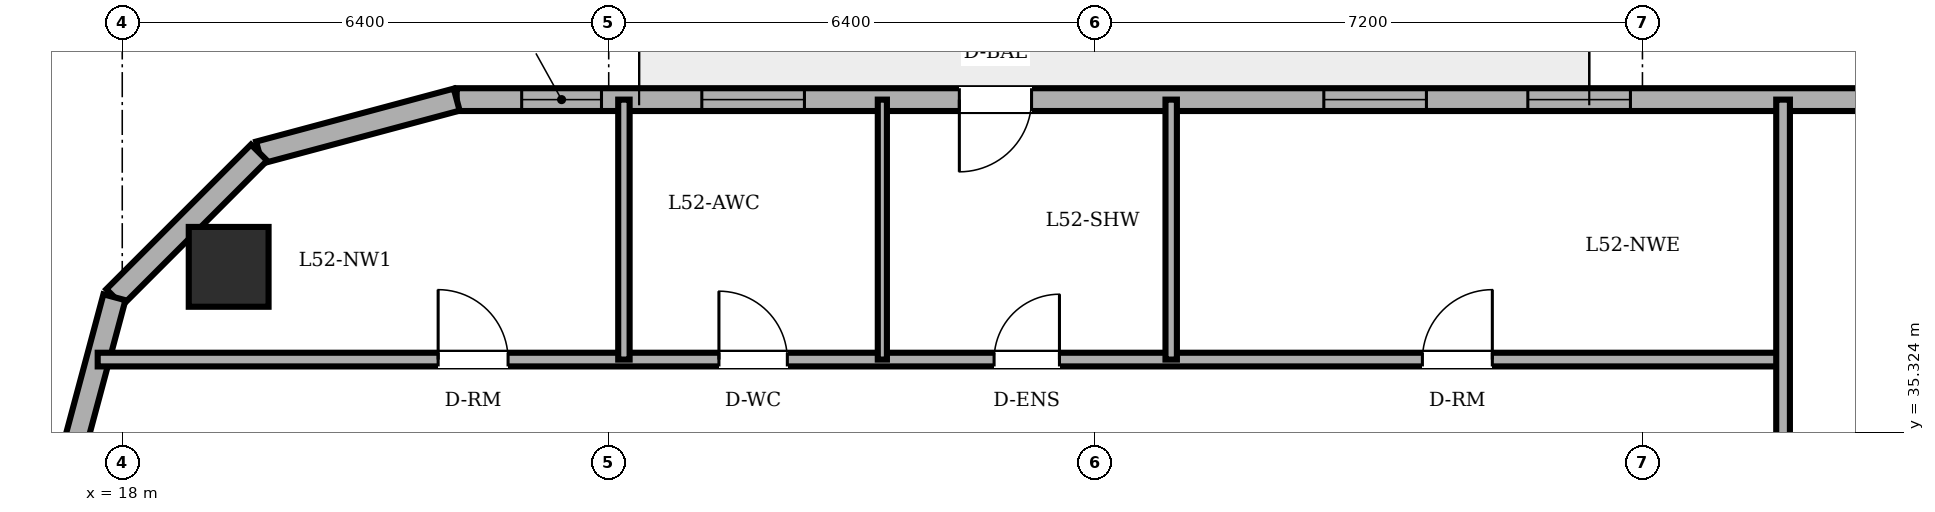
"""IFC4 building model, lengths in metres.
Left out: names, types, materials, properties, quantities, classifications, styles, units other than length and angle.
Written with IfcOpenShell. Run it as: python <this file> out.ifc"""

import sys

from ifc_helpers import new_model, si_unit, direction, frame, frame_2d, origin, origin_2d, place, context, subcontext, project, spatial, rectangle, circle, extrude, element, fill, save


model = new_model("IFC4")
c1 = context("Model", 3, precision=1e-05, world=origin(), true_north=direction((0.0, 1.0)))
c2 = subcontext(c1, "Body", "Model", "MODEL_VIEW")
j1 = project(units=[si_unit("LENGTHUNIT", "METRE"), si_unit("PLANEANGLEUNIT", "RADIAN")], contexts=[c1])
p1 = place(None, origin())
s1 = spatial("IfcSite", under=j1, at=p1, CompositionType="ELEMENT")
p2 = place(p1, origin())
s2 = spatial("IfcBuilding", under=s1, at=p2, CompositionType="ELEMENT")
p3 = place(p2, frame((0.0, 0.0, 201.3)))
s3 = spatial("IfcBuildingStorey", under=s2, at=p3, CompositionType="ELEMENT", Elevation=201.3)
p4 = place(p3, frame((19.4, 37.5, 0.0), z_axis=(0.0, 0.0, 1.0), x_axis=(1.0, 0.0, 0.0)))
e1 = element("IfcColumn", 1, at=p4, inside=s3, PredefinedType="COLUMN", context=c2, shape_type="SweptSolid", body=[
    extrude(circle(Radius=0.525, at=origin_2d()), origin(), (0.0, 0.0, 1.0), 3.6),
])
p5 = place(p3, frame((54.885, 39.7, 0.0), z_axis=(0.0, 0.0, 1.0), x_axis=(-1.0, 0.0, 0.0)))
e2 = element("IfcWall", 2, at=p5, inside=s3, PredefinedType="SOLIDWALL", context=c2, shape_type="SweptSolid", body=[
    extrude(rectangle(XDim=32.485, YDim=0.3, at=frame_2d((16.243, 0.0))), origin(), (0.0, 0.0, 1.0), 3.4),
])
p6 = place(p5, frame((24.922, 0.0, 0.0)))
e3 = element("IfcOpeningElement", 3, at=p6, cuts=e2, PredefinedType="OPENING", context=c2, shape_type="SweptSolid", body=[
    extrude(rectangle(XDim=0.95, YDim=2.2, at=frame_2d((0.475, 1.1))), frame((0.0, 0.16, 0.0), z_axis=(0.0, -1.0, 0.0), x_axis=(1.0, 0.0, 0.0)), (0.0, 0.0, 1.0), 0.32),
])
p7 = place(p5, frame((4.57, 0.0, 0.85)))
e4 = element("IfcOpeningElement", 4, at=p7, cuts=e2, PredefinedType="OPENING", context=c2, shape_type="SweptSolid", body=[
    extrude(rectangle(XDim=1.35, YDim=1.55, at=frame_2d((0.675, 0.775))), frame((0.0, 0.16, 0.0), z_axis=(0.0, -1.0, 0.0), x_axis=(1.0, 0.0, 0.0)), (0.0, 0.0, 1.0), 0.32),
])
p8 = place(p5, frame((9.465, 0.0, 0.85)))
e5 = element("IfcOpeningElement", 5, at=p8, cuts=e2, PredefinedType="OPENING", context=c2, shape_type="SweptSolid", body=[
    extrude(rectangle(XDim=1.35, YDim=1.55, at=frame_2d((0.675, 0.775))), frame((0.0, 0.16, 0.0), z_axis=(0.0, -1.0, 0.0), x_axis=(1.0, 0.0, 0.0)), (0.0, 0.0, 1.0), 0.32),
])
p9 = place(p5, frame((17.043, 0.0, 0.85)))
e6 = element("IfcOpeningElement", 6, at=p9, cuts=e2, PredefinedType="OPENING", context=c2, shape_type="SweptSolid", body=[
    extrude(rectangle(XDim=1.35, YDim=1.55, at=frame_2d((0.675, 0.775))), frame((0.0, 0.16, 0.0), z_axis=(0.0, -1.0, 0.0), x_axis=(1.0, 0.0, 0.0)), (0.0, 0.0, 1.0), 0.32),
])
p10 = place(p5, frame((19.727, 0.0, 0.85)))
e7 = element("IfcOpeningElement", 7, at=p10, cuts=e2, PredefinedType="OPENING", context=c2, shape_type="SweptSolid", body=[
    extrude(rectangle(XDim=1.35, YDim=1.55, at=frame_2d((0.675, 0.775))), frame((0.0, 0.16, 0.0), z_axis=(0.0, -1.0, 0.0), x_axis=(1.0, 0.0, 0.0)), (0.0, 0.0, 1.0), 0.32),
])
p11 = place(p5, frame((27.91, 0.0, 0.85)))
e8 = element("IfcOpeningElement", 8, at=p11, cuts=e2, PredefinedType="OPENING", context=c2, shape_type="SweptSolid", body=[
    extrude(rectangle(XDim=1.35, YDim=1.55, at=frame_2d((0.675, 0.775))), frame((0.0, 0.16, 0.0), z_axis=(0.0, -1.0, 0.0), x_axis=(1.0, 0.0, 0.0)), (0.0, 0.0, 1.0), 0.32),
])
p12 = place(p5, frame((30.58, 0.0, 0.85)))
e9 = element("IfcOpeningElement", 9, at=p12, cuts=e2, PredefinedType="OPENING", context=c2, shape_type="SweptSolid", body=[
    extrude(rectangle(XDim=1.05, YDim=1.55, at=frame_2d((0.525, 0.775))), frame((0.0, 0.16, 0.0), z_axis=(0.0, -1.0, 0.0), x_axis=(1.0, 0.0, 0.0)), (0.0, 0.0, 1.0), 0.32),
])
p13 = place(p3, frame((22.4, 39.7, 0.0), z_axis=(0.0, 0.0, 1.0), x_axis=(-0.965889330541, -0.258955210695, 0.0)))
e10 = element("IfcWall", 10, at=p13, inside=s3, PredefinedType="SOLIDWALL", context=c2, shape_type="SweptSolid", body=[
    extrude(rectangle(XDim=2.692, YDim=0.3, at=frame_2d((1.346, 0.0))), origin(), (0.0, 0.0, 1.0), 3.4),
])
p14 = place(p3, frame((19.8, 39.003, 0.0), z_axis=(0.0, 0.0, 1.0), x_axis=(-0.707152139074, -0.70706142039, 0.0)))
e11 = element("IfcWall", 11, at=p14, inside=s3, PredefinedType="SOLIDWALL", context=c2, shape_type="SweptSolid", body=[
    extrude(rectangle(XDim=2.691, YDim=0.3, at=frame_2d((1.346, 0.0))), origin(), (0.0, 0.0, 1.0), 3.4),
])
p15 = place(p3, frame((17.897, 37.1, 0.0), z_axis=(0.0, 0.0, 1.0), x_axis=(-0.258932525951, -0.965895412042, 0.0)))
e12 = element("IfcWall", 12, at=p15, inside=s3, PredefinedType="SOLIDWALL", context=c2, shape_type="SweptSolid", body=[
    extrude(rectangle(XDim=2.692, YDim=0.3, at=frame_2d((1.346, 0.0))), origin(), (0.0, 0.0, 1.0), 3.4),
])
p16 = place(p3, frame((17.677, 36.28, 0.0), z_axis=(0.0, 0.0, 1.0), x_axis=(1.0, 0.0, 0.0)))
e13 = element("IfcWall", 13, at=p16, inside=s3, PredefinedType="PARTITIONING", context=c2, shape_type="SweptSolid", body=[
    extrude(rectangle(XDim=22.173, YDim=0.18, at=frame_2d((11.086, 0.0))), origin(), (0.0, 0.0, 1.0), 3.4),
])
p17 = place(p16, frame((8.173, 0.0, 0.0)))
e14 = element("IfcOpeningElement", 14, at=p17, cuts=e13, PredefinedType="OPENING", context=c2, shape_type="SweptSolid", body=[
    extrude(rectangle(XDim=0.9, YDim=2.1, at=frame_2d((0.45, 1.05))), frame((0.0, 0.1, 0.0), z_axis=(0.0, -1.0, 0.0), x_axis=(1.0, 0.0, 0.0)), (0.0, 0.0, 1.0), 0.2),
])
p18 = place(p16, frame((11.793, 0.0, 0.0)))
e15 = element("IfcOpeningElement", 15, at=p18, cuts=e13, PredefinedType="OPENING", context=c2, shape_type="SweptSolid", body=[
    extrude(rectangle(XDim=0.86, YDim=2.1, at=frame_2d((0.43, 1.05))), frame((0.0, 0.1, 0.0), z_axis=(0.0, -1.0, 0.0), x_axis=(1.0, 0.0, 0.0)), (0.0, 0.0, 1.0), 0.2),
])
p19 = place(p16, frame((4.479, 0.0, 0.0)))
e16 = element("IfcOpeningElement", 16, at=p19, cuts=e13, PredefinedType="OPENING", context=c2, shape_type="SweptSolid", body=[
    extrude(rectangle(XDim=0.92, YDim=2.1, at=frame_2d((0.46, 1.05))), frame((0.0, 0.1, 0.0), z_axis=(0.0, -1.0, 0.0), x_axis=(1.0, 0.0, 0.0)), (0.0, 0.0, 1.0), 0.2),
])
p20 = place(p16, frame((17.428, 0.0, 0.0)))
e17 = element("IfcOpeningElement", 17, at=p20, cuts=e13, PredefinedType="OPENING", context=c2, shape_type="SweptSolid", body=[
    extrude(rectangle(XDim=0.92, YDim=2.1, at=frame_2d((0.46, 1.05))), frame((0.0, 0.1, 0.0), z_axis=(0.0, -1.0, 0.0), x_axis=(1.0, 0.0, 0.0)), (0.0, 0.0, 1.0), 0.2),
])
p21 = place(p3, frame((24.6, 36.28, 0.0), z_axis=(0.0, 0.0, 1.0), x_axis=(0.0, 1.0, 0.0)))
e18 = element("IfcWall", 18, at=p21, inside=s3, PredefinedType="PARTITIONING", context=c2, shape_type="SweptSolid", body=[
    extrude(rectangle(XDim=3.42, YDim=0.15, at=frame_2d((1.71, 0.0))), origin(), (0.0, 0.0, 1.0), 3.4),
])
p22 = place(p3, frame((28.0, 36.28, 0.0), z_axis=(0.0, 0.0, 1.0), x_axis=(0.0, 1.0, 0.0)))
e19 = element("IfcWall", 19, at=p22, inside=s3, PredefinedType="PARTITIONING", context=c2, shape_type="SweptSolid", body=[
    extrude(rectangle(XDim=3.42, YDim=0.12, at=frame_2d((1.71, 0.0))), origin(), (0.0, 0.0, 1.0), 3.4),
])
p23 = place(p3, frame((31.8, 36.28, 0.0), z_axis=(0.0, 0.0, 1.0), x_axis=(0.0, 1.0, 0.0)))
e20 = element("IfcWall", 20, at=p23, inside=s3, PredefinedType="PARTITIONING", context=c2, shape_type="SweptSolid", body=[
    extrude(rectangle(XDim=3.42, YDim=0.15, at=frame_2d((1.71, 0.0))), origin(), (0.0, 0.0, 1.0), 3.4),
])
p24 = place(p3, frame((39.85, 25.18, 0.0), z_axis=(0.0, 0.0, 1.0), x_axis=(0.0, 1.0, 0.0)))
e21 = element("IfcWall", 21, at=p24, inside=s3, PredefinedType="PARTITIONING", context=c2, shape_type="SweptSolid", body=[
    extrude(rectangle(XDim=14.52, YDim=0.18, at=frame_2d((7.26, 0.0))), origin(), (0.0, 0.0, 1.0), 3.4),
])
p25 = place(p6, origin())
e22 = element("IfcDoor", 22, at=p25, inside=s3, OperationType="SINGLE_SWING_RIGHT", PredefinedType="DOOR", context=c2, shape_type="SweptSolid", body=[
    extrude(rectangle(XDim=0.95, YDim=2.2, at=frame_2d((0.475, 1.1))), frame((0.0, 0.025, 0.0), z_axis=(0.0, -1.0, 0.0), x_axis=(1.0, 0.0, 0.0)), (0.0, 0.0, 1.0), 0.05),
])
fill(e3, e22)
p26 = place(p9, origin())
e23 = element("IfcWindow", 23, at=p26, inside=s3, PartitioningType="SINGLE_PANEL", PredefinedType="WINDOW", context=c2, shape_type="SweptSolid", body=[
    extrude(rectangle(XDim=1.35, YDim=1.55, at=frame_2d((0.675, 0.775))), frame((0.0, 0.03, 0.0), z_axis=(0.0, -1.0, 0.0), x_axis=(1.0, 0.0, 0.0)), (0.0, 0.0, 1.0), 0.06),
])
fill(e6, e23)
p27 = place(p10, origin())
e24 = element("IfcWindow", 24, at=p27, inside=s3, PartitioningType="SINGLE_PANEL", PredefinedType="WINDOW", context=c2, shape_type="SweptSolid", body=[
    extrude(rectangle(XDim=1.35, YDim=1.55, at=frame_2d((0.675, 0.775))), frame((0.0, 0.03, 0.0), z_axis=(0.0, -1.0, 0.0), x_axis=(1.0, 0.0, 0.0)), (0.0, 0.0, 1.0), 0.06),
])
fill(e7, e24)
p28 = place(p11, origin())
e25 = element("IfcWindow", 25, at=p28, inside=s3, PartitioningType="SINGLE_PANEL", PredefinedType="WINDOW", context=c2, shape_type="SweptSolid", body=[
    extrude(rectangle(XDim=1.35, YDim=1.55, at=frame_2d((0.675, 0.775))), frame((0.0, 0.03, 0.0), z_axis=(0.0, -1.0, 0.0), x_axis=(1.0, 0.0, 0.0)), (0.0, 0.0, 1.0), 0.06),
])
fill(e8, e25)
p29 = place(p12, origin())
e26 = element("IfcWindow", 26, at=p29, inside=s3, PartitioningType="SINGLE_PANEL", PredefinedType="WINDOW", context=c2, shape_type="SweptSolid", body=[
    extrude(rectangle(XDim=1.05, YDim=1.55, at=frame_2d((0.525, 0.775))), frame((0.0, 0.03, 0.0), z_axis=(0.0, -1.0, 0.0), x_axis=(1.0, 0.0, 0.0)), (0.0, 0.0, 1.0), 0.06),
])
fill(e9, e26)
p30 = place(p17, origin())
e27 = element("IfcDoor", 27, at=p30, inside=s3, OperationType="SINGLE_SWING_LEFT", PredefinedType="DOOR", context=c2, shape_type="SweptSolid", body=[
    extrude(rectangle(XDim=0.9, YDim=2.1, at=frame_2d((0.45, 1.05))), frame((0.0, 0.025, 0.0), z_axis=(0.0, -1.0, 0.0), x_axis=(1.0, 0.0, 0.0)), (0.0, 0.0, 1.0), 0.05),
])
fill(e14, e27)
p31 = place(p18, origin())
e28 = element("IfcDoor", 28, at=p31, inside=s3, OperationType="SINGLE_SWING_RIGHT", PredefinedType="DOOR", context=c2, shape_type="SweptSolid", body=[
    extrude(rectangle(XDim=0.86, YDim=2.1, at=frame_2d((0.43, 1.05))), frame((0.0, 0.025, 0.0), z_axis=(0.0, -1.0, 0.0), x_axis=(1.0, 0.0, 0.0)), (0.0, 0.0, 1.0), 0.05),
])
fill(e15, e28)
p32 = place(p19, origin())
e29 = element("IfcDoor", 29, at=p32, inside=s3, OperationType="SINGLE_SWING_LEFT", PredefinedType="DOOR", context=c2, shape_type="SweptSolid", body=[
    extrude(rectangle(XDim=0.92, YDim=2.1, at=frame_2d((0.46, 1.05))), frame((0.0, 0.025, 0.0), z_axis=(0.0, -1.0, 0.0), x_axis=(1.0, 0.0, 0.0)), (0.0, 0.0, 1.0), 0.05),
])
fill(e16, e29)
p33 = place(p20, origin())
e30 = element("IfcDoor", 30, at=p33, inside=s3, OperationType="SINGLE_SWING_RIGHT", PredefinedType="DOOR", context=c2, shape_type="SweptSolid", body=[
    extrude(rectangle(XDim=0.92, YDim=2.1, at=frame_2d((0.46, 1.05))), frame((0.0, 0.025, 0.0), z_axis=(0.0, -1.0, 0.0), x_axis=(1.0, 0.0, 0.0)), (0.0, 0.0, 1.0), 0.05),
])
fill(e17, e30)
save(model, sys.argv[1])
